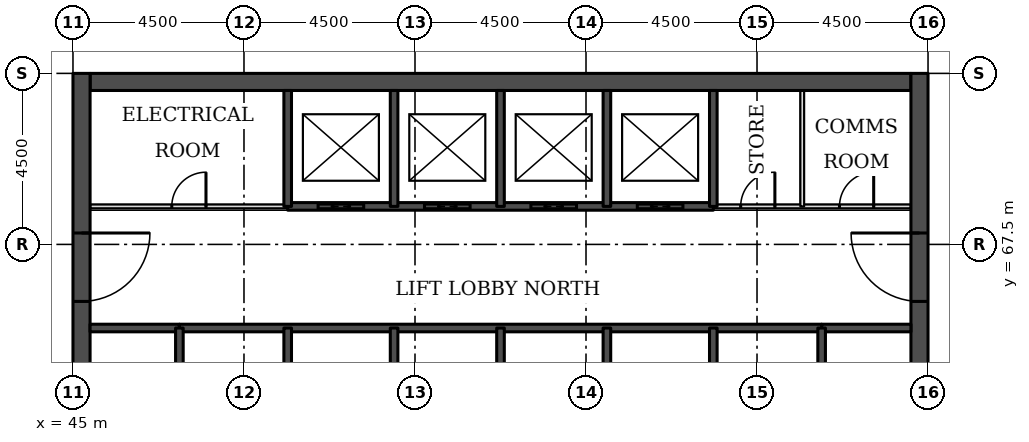
"""IFC4 building model, lengths in metres.
Left out: names, types, materials, properties, quantities, classifications, styles, units other than length and angle.
Written with IfcOpenShell. Run it as: python <this file> out.ifc"""

import sys

from ifc_helpers import new_model, si_unit, direction, frame, frame_2d, origin, place, context, subcontext, project, spatial, rectangle, extrude, element, fill, save


model = new_model("IFC4")
c1 = context("Model", 3, precision=1e-05, world=origin(), true_north=direction((0.0, 1.0)))
c2 = subcontext(c1, "Body", "Model", "MODEL_VIEW")
j1 = project(units=[si_unit("LENGTHUNIT", "METRE"), si_unit("PLANEANGLEUNIT", "RADIAN")], contexts=[c1])
p1 = place(None, origin())
s1 = spatial("IfcSite", under=j1, at=p1, CompositionType="ELEMENT")
p2 = place(p1, origin())
s2 = spatial("IfcBuilding", under=s1, at=p2, CompositionType="ELEMENT")
p3 = place(p2, frame((0.0, 0.0, 130.7)))
s3 = spatial("IfcBuildingStorey", under=s2, at=p3, CompositionType="ELEMENT", Elevation=130.7)
p4 = place(p3, frame((45.45, 71.775, 0.0), z_axis=(0.0, 0.0, 1.0), x_axis=(1.0, 0.0, 0.0)))
e1 = element("IfcWall", 1, at=p4, inside=s3, PredefinedType="SHEAR", context=c2, shape_type="SweptSolid", body=[
    extrude(rectangle(XDim=21.6, YDim=0.45, at=frame_2d((10.8, 0.0))), origin(), (0.0, 0.0, 1.0), 3.7),
])
p5 = place(p3, frame((45.225, 49.5, 0.0), z_axis=(0.0, 0.0, 1.0), x_axis=(0.0, 1.0, 0.0)))
e2 = element("IfcWall", 2, at=p5, inside=s3, PredefinedType="SHEAR", context=c2, shape_type="SweptSolid", body=[
    extrude(rectangle(XDim=22.5, YDim=0.45, at=frame_2d((11.25, 0.0))), origin(), (0.0, 0.0, 1.0), 3.7),
])
p6 = place(p5, frame((4.2, 0.0, 0.0)))
e3 = element("IfcOpeningElement", 3, at=p6, cuts=e2, PredefinedType="OPENING", context=c2, shape_type="SweptSolid", body=[
    extrude(rectangle(XDim=1.8, YDim=2.1, at=frame_2d((0.9, 1.05))), frame((0.0, 0.235, 0.0), z_axis=(0.0, -1.0, 0.0), x_axis=(1.0, 0.0, 0.0)), (0.0, 0.0, 1.0), 0.47),
])
p7 = place(p5, frame((6.9, 0.0, 0.0)))
e4 = element("IfcOpeningElement", 4, at=p7, cuts=e2, PredefinedType="OPENING", context=c2, shape_type="SweptSolid", body=[
    extrude(rectangle(XDim=1.1, YDim=2.1, at=frame_2d((0.55, 1.05))), frame((0.0, 0.235, 0.0), z_axis=(0.0, -1.0, 0.0), x_axis=(1.0, 0.0, 0.0)), (0.0, 0.0, 1.0), 0.47),
])
p8 = place(p5, frame((13.6, 0.0, 0.0)))
e5 = element("IfcOpeningElement", 5, at=p8, cuts=e2, PredefinedType="OPENING", context=c2, shape_type="SweptSolid", body=[
    extrude(rectangle(XDim=1.1, YDim=2.1, at=frame_2d((0.55, 1.05))), frame((0.0, 0.235, 0.0), z_axis=(0.0, -1.0, 0.0), x_axis=(1.0, 0.0, 0.0)), (0.0, 0.0, 1.0), 0.47),
])
p9 = place(p5, frame((16.5, 0.0, 0.0)))
e6 = element("IfcOpeningElement", 6, at=p9, cuts=e2, PredefinedType="OPENING", context=c2, shape_type="SweptSolid", body=[
    extrude(rectangle(XDim=1.8, YDim=2.1, at=frame_2d((0.9, 1.05))), frame((0.0, 0.235, 0.0), z_axis=(0.0, -1.0, 0.0), x_axis=(1.0, 0.0, 0.0)), (0.0, 0.0, 1.0), 0.47),
])
p10 = place(p3, frame((67.275, 49.5, 0.0), z_axis=(0.0, 0.0, 1.0), x_axis=(0.0, 1.0, 0.0)))
e7 = element("IfcWall", 7, at=p10, inside=s3, PredefinedType="SHEAR", context=c2, shape_type="SweptSolid", body=[
    extrude(rectangle(XDim=22.5, YDim=0.45, at=frame_2d((11.25, 0.0))), origin(), (0.0, 0.0, 1.0), 3.7),
])
p11 = place(p10, frame((4.2, 0.0, 0.0)))
e8 = element("IfcOpeningElement", 8, at=p11, cuts=e7, PredefinedType="OPENING", context=c2, shape_type="SweptSolid", body=[
    extrude(rectangle(XDim=1.8, YDim=2.1, at=frame_2d((0.9, 1.05))), frame((0.0, 0.235, 0.0), z_axis=(0.0, -1.0, 0.0), x_axis=(1.0, 0.0, 0.0)), (0.0, 0.0, 1.0), 0.47),
])
p12 = place(p10, frame((6.9, 0.0, 0.0)))
e9 = element("IfcOpeningElement", 9, at=p12, cuts=e7, PredefinedType="OPENING", context=c2, shape_type="SweptSolid", body=[
    extrude(rectangle(XDim=1.1, YDim=2.1, at=frame_2d((0.55, 1.05))), frame((0.0, 0.235, 0.0), z_axis=(0.0, -1.0, 0.0), x_axis=(1.0, 0.0, 0.0)), (0.0, 0.0, 1.0), 0.47),
])
p13 = place(p10, frame((13.6, 0.0, 0.0)))
e10 = element("IfcOpeningElement", 10, at=p13, cuts=e7, PredefinedType="OPENING", context=c2, shape_type="SweptSolid", body=[
    extrude(rectangle(XDim=1.1, YDim=2.1, at=frame_2d((0.55, 1.05))), frame((0.0, 0.235, 0.0), z_axis=(0.0, -1.0, 0.0), x_axis=(1.0, 0.0, 0.0)), (0.0, 0.0, 1.0), 0.47),
])
p14 = place(p10, frame((16.5, 0.0, 0.0)))
e11 = element("IfcOpeningElement", 11, at=p14, cuts=e7, PredefinedType="OPENING", context=c2, shape_type="SweptSolid", body=[
    extrude(rectangle(XDim=1.8, YDim=2.1, at=frame_2d((0.9, 1.05))), frame((0.0, 0.235, 0.0), z_axis=(0.0, -1.0, 0.0), x_axis=(1.0, 0.0, 0.0)), (0.0, 0.0, 1.0), 0.47),
])
for number, where, z_axis, x_axis in (
    (12, (45.45, 65.3, 0.0), (0.0, 0.0, 1.0), (1.0, 0.0, 0.0)),
    (13, (64.7, 65.3, 0.0), (0.0, 0.0, 1.0), (1.0, 0.0, 0.0)),
):
    element("IfcWall", number, at=place(p3, frame(where, z_axis=z_axis, x_axis=x_axis)), inside=s3, PredefinedType="SOLIDWALL", context=c2, shape_type="SweptSolid", body=[
        extrude(rectangle(XDim=2.35, YDim=0.2, at=frame_2d((1.175, 0.0))), origin(), (0.0, 0.0, 1.0), 3.55),
    ])
p15 = place(p3, frame((47.8, 65.3, 0.0), z_axis=(0.0, 0.0, 1.0), x_axis=(1.0, 0.0, 0.0)))
e14 = element("IfcWall", 14, at=p15, inside=s3, PredefinedType="SOLIDWALL", context=c2, shape_type="SweptSolid", body=[
    extrude(rectangle(XDim=16.9, YDim=0.2, at=frame_2d((8.45, 0.0))), origin(), (0.0, 0.0, 1.0), 3.55),
])
p16 = place(p3, frame((45.45, 68.5, 0.0), z_axis=(0.0, 0.0, 1.0), x_axis=(1.0, 0.0, 0.0)))
e15 = element("IfcWall", 15, at=p16, inside=s3, PredefinedType="PARTITIONING", context=c2, shape_type="SweptSolid", body=[
    extrude(rectangle(XDim=5.2, YDim=0.1, at=frame_2d((2.6, 0.0))), origin(), (0.0, 0.0, 1.0), 3.55),
])
p17 = place(p16, frame((2.15, 0.0, 0.0)))
e16 = element("IfcOpeningElement", 16, at=p17, cuts=e15, PredefinedType="OPENING", context=c2, shape_type="SweptSolid", body=[
    extrude(rectangle(XDim=0.9, YDim=2.1, at=frame_2d((0.45, 1.05))), frame((0.0, 0.06, 0.0), z_axis=(0.0, -1.0, 0.0), x_axis=(1.0, 0.0, 0.0)), (0.0, 0.0, 1.0), 0.12),
])
p18 = place(p3, frame((61.85, 68.5, 0.0), z_axis=(0.0, 0.0, 1.0), x_axis=(1.0, 0.0, 0.0)))
e17 = element("IfcWall", 17, at=p18, inside=s3, PredefinedType="PARTITIONING", context=c2, shape_type="SweptSolid", body=[
    extrude(rectangle(XDim=5.2, YDim=0.1, at=frame_2d((2.6, 0.0))), origin(), (0.0, 0.0, 1.0), 3.55),
])
p19 = place(p18, frame((3.32, 0.0, 0.0)))
e18 = element("IfcOpeningElement", 18, at=p19, cuts=e17, PredefinedType="OPENING", context=c2, shape_type="SweptSolid", body=[
    extrude(rectangle(XDim=0.9, YDim=2.1, at=frame_2d((0.45, 1.05))), frame((0.0, 0.06, 0.0), z_axis=(0.0, -1.0, 0.0), x_axis=(1.0, 0.0, 0.0)), (0.0, 0.0, 1.0), 0.12),
])
p20 = place(p18, frame((0.72, 0.0, 0.0)))
e19 = element("IfcOpeningElement", 19, at=p20, cuts=e17, PredefinedType="OPENING", context=c2, shape_type="SweptSolid", body=[
    extrude(rectangle(XDim=0.9, YDim=2.1, at=frame_2d((0.45, 1.05))), frame((0.0, 0.06, 0.0), z_axis=(0.0, -1.0, 0.0), x_axis=(1.0, 0.0, 0.0)), (0.0, 0.0, 1.0), 0.12),
])
p21 = place(p3, frame((50.65, 68.5, 0.0), z_axis=(0.0, 0.0, 1.0), x_axis=(1.0, 0.0, 0.0)))
e20 = element("IfcWall", 20, at=p21, inside=s3, PredefinedType="SOLIDWALL", context=c2, shape_type="SweptSolid", body=[
    extrude(rectangle(XDim=11.2, YDim=0.2, at=frame_2d((5.6, 0.0))), origin(), (0.0, 0.0, 1.0), 3.55),
])
p22 = place(p21, frame((0.8, 0.0, 0.0)))
e21 = element("IfcOpeningElement", 21, at=p22, cuts=e20, PredefinedType="OPENING", context=c2, shape_type="SweptSolid", body=[
    extrude(rectangle(XDim=1.2, YDim=2.1, at=frame_2d((0.6, 1.05))), frame((0.0, 0.11, 0.0), z_axis=(0.0, -1.0, 0.0), x_axis=(1.0, 0.0, 0.0)), (0.0, 0.0, 1.0), 0.22),
])
p23 = place(p21, frame((3.6, 0.0, 0.0)))
e22 = element("IfcOpeningElement", 22, at=p23, cuts=e20, PredefinedType="OPENING", context=c2, shape_type="SweptSolid", body=[
    extrude(rectangle(XDim=1.2, YDim=2.1, at=frame_2d((0.6, 1.05))), frame((0.0, 0.11, 0.0), z_axis=(0.0, -1.0, 0.0), x_axis=(1.0, 0.0, 0.0)), (0.0, 0.0, 1.0), 0.22),
])
p24 = place(p21, frame((6.4, 0.0, 0.0)))
e23 = element("IfcOpeningElement", 23, at=p24, cuts=e20, PredefinedType="OPENING", context=c2, shape_type="SweptSolid", body=[
    extrude(rectangle(XDim=1.2, YDim=2.1, at=frame_2d((0.6, 1.05))), frame((0.0, 0.11, 0.0), z_axis=(0.0, -1.0, 0.0), x_axis=(1.0, 0.0, 0.0)), (0.0, 0.0, 1.0), 0.22),
])
p25 = place(p21, frame((9.2, 0.0, 0.0)))
e24 = element("IfcOpeningElement", 24, at=p25, cuts=e20, PredefinedType="OPENING", context=c2, shape_type="SweptSolid", body=[
    extrude(rectangle(XDim=1.2, YDim=2.1, at=frame_2d((0.6, 1.05))), frame((0.0, 0.11, 0.0), z_axis=(0.0, -1.0, 0.0), x_axis=(1.0, 0.0, 0.0)), (0.0, 0.0, 1.0), 0.22),
])
p26 = place(p3, frame((47.8, 62.0, 0.0), z_axis=(0.0, 0.0, 1.0), x_axis=(0.0, 1.0, 0.0)))
e25 = element("IfcWall", 25, at=p26, inside=s3, PredefinedType="SOLIDWALL", context=c2, shape_type="SweptSolid", body=[
    extrude(rectangle(XDim=3.3, YDim=0.2, at=frame_2d((1.65, 0.0))), origin(), (0.0, 0.0, 1.0), 3.55),
])
p27 = place(p26, frame((1.1, 0.0, 0.0)))
e26 = element("IfcOpeningElement", 26, at=p27, cuts=e25, PredefinedType="OPENING", context=c2, shape_type="SweptSolid", body=[
    extrude(rectangle(XDim=1.1, YDim=2.1, at=frame_2d((0.55, 1.05))), frame((0.0, 0.11, 0.0), z_axis=(0.0, -1.0, 0.0), x_axis=(1.0, 0.0, 0.0)), (0.0, 0.0, 1.0), 0.22),
])
p28 = place(p3, frame((50.65, 62.0, 0.0), z_axis=(0.0, 0.0, 1.0), x_axis=(0.0, 1.0, 0.0)))
e27 = element("IfcWall", 27, at=p28, inside=s3, PredefinedType="SOLIDWALL", context=c2, shape_type="SweptSolid", body=[
    extrude(rectangle(XDim=3.3, YDim=0.2, at=frame_2d((1.65, 0.0))), origin(), (0.0, 0.0, 1.0), 3.55),
])
p29 = place(p3, frame((50.65, 68.5, 0.0), z_axis=(0.0, 0.0, 1.0), x_axis=(0.0, 1.0, 0.0)))
e28 = element("IfcWall", 28, at=p29, inside=s3, PredefinedType="SOLIDWALL", context=c2, shape_type="SweptSolid", body=[
    extrude(rectangle(XDim=3.05, YDim=0.2, at=frame_2d((1.525, 0.0))), origin(), (0.0, 0.0, 1.0), 3.55),
])
p30 = place(p3, frame((53.45, 62.5, 0.0), z_axis=(0.0, 0.0, 1.0), x_axis=(0.0, 1.0, 0.0)))
e29 = element("IfcWall", 29, at=p30, inside=s3, PredefinedType="SOLIDWALL", context=c2, shape_type="SweptSolid", body=[
    extrude(rectangle(XDim=2.8, YDim=0.2, at=frame_2d((1.4, 0.0))), origin(), (0.0, 0.0, 1.0), 3.55),
])
p31 = place(p3, frame((53.45, 68.5, 0.0), z_axis=(0.0, 0.0, 1.0), x_axis=(0.0, 1.0, 0.0)))
e30 = element("IfcWall", 30, at=p31, inside=s3, PredefinedType="SOLIDWALL", context=c2, shape_type="SweptSolid", body=[
    extrude(rectangle(XDim=3.05, YDim=0.2, at=frame_2d((1.525, 0.0))), origin(), (0.0, 0.0, 1.0), 3.55),
])
p32 = place(p3, frame((56.25, 62.5, 0.0), z_axis=(0.0, 0.0, 1.0), x_axis=(0.0, 1.0, 0.0)))
e31 = element("IfcWall", 31, at=p32, inside=s3, PredefinedType="SOLIDWALL", context=c2, shape_type="SweptSolid", body=[
    extrude(rectangle(XDim=2.8, YDim=0.2, at=frame_2d((1.4, 0.0))), origin(), (0.0, 0.0, 1.0), 3.55),
])
p33 = place(p3, frame((56.25, 68.5, 0.0), z_axis=(0.0, 0.0, 1.0), x_axis=(0.0, 1.0, 0.0)))
e32 = element("IfcWall", 32, at=p33, inside=s3, PredefinedType="SOLIDWALL", context=c2, shape_type="SweptSolid", body=[
    extrude(rectangle(XDim=3.05, YDim=0.2, at=frame_2d((1.525, 0.0))), origin(), (0.0, 0.0, 1.0), 3.55),
])
p34 = place(p3, frame((59.05, 62.5, 0.0), z_axis=(0.0, 0.0, 1.0), x_axis=(0.0, 1.0, 0.0)))
e33 = element("IfcWall", 33, at=p34, inside=s3, PredefinedType="SOLIDWALL", context=c2, shape_type="SweptSolid", body=[
    extrude(rectangle(XDim=2.8, YDim=0.2, at=frame_2d((1.4, 0.0))), origin(), (0.0, 0.0, 1.0), 3.55),
])
p35 = place(p3, frame((59.05, 68.5, 0.0), z_axis=(0.0, 0.0, 1.0), x_axis=(0.0, 1.0, 0.0)))
e34 = element("IfcWall", 34, at=p35, inside=s3, PredefinedType="SOLIDWALL", context=c2, shape_type="SweptSolid", body=[
    extrude(rectangle(XDim=3.05, YDim=0.2, at=frame_2d((1.525, 0.0))), origin(), (0.0, 0.0, 1.0), 3.55),
])
p36 = place(p3, frame((61.85, 62.0, 0.0), z_axis=(0.0, 0.0, 1.0), x_axis=(0.0, 1.0, 0.0)))
e35 = element("IfcWall", 35, at=p36, inside=s3, PredefinedType="SOLIDWALL", context=c2, shape_type="SweptSolid", body=[
    extrude(rectangle(XDim=3.3, YDim=0.2, at=frame_2d((1.65, 0.0))), origin(), (0.0, 0.0, 1.0), 3.55),
])
p37 = place(p3, frame((61.85, 68.5, 0.0), z_axis=(0.0, 0.0, 1.0), x_axis=(0.0, 1.0, 0.0)))
e36 = element("IfcWall", 36, at=p37, inside=s3, PredefinedType="SOLIDWALL", context=c2, shape_type="SweptSolid", body=[
    extrude(rectangle(XDim=3.05, YDim=0.2, at=frame_2d((1.525, 0.0))), origin(), (0.0, 0.0, 1.0), 3.55),
])
p38 = place(p3, frame((64.19, 68.5, 0.0), z_axis=(0.0, 0.0, 1.0), x_axis=(0.0, 1.0, 0.0)))
e37 = element("IfcWall", 37, at=p38, inside=s3, PredefinedType="PARTITIONING", context=c2, shape_type="SweptSolid", body=[
    extrude(rectangle(XDim=3.05, YDim=0.1, at=frame_2d((1.525, 0.0))), origin(), (0.0, 0.0, 1.0), 3.55),
])
p39 = place(p3, frame((64.7, 62.0, 0.0), z_axis=(0.0, 0.0, 1.0), x_axis=(0.0, 1.0, 0.0)))
e38 = element("IfcWall", 38, at=p39, inside=s3, PredefinedType="SOLIDWALL", context=c2, shape_type="SweptSolid", body=[
    extrude(rectangle(XDim=3.3, YDim=0.2, at=frame_2d((1.65, 0.0))), origin(), (0.0, 0.0, 1.0), 3.55),
])
p40 = place(p39, frame((1.1, 0.0, 0.0)))
e39 = element("IfcOpeningElement", 39, at=p40, cuts=e38, PredefinedType="OPENING", context=c2, shape_type="SweptSolid", body=[
    extrude(rectangle(XDim=1.1, YDim=2.1, at=frame_2d((0.55, 1.05))), frame((0.0, 0.11, 0.0), z_axis=(0.0, -1.0, 0.0), x_axis=(1.0, 0.0, 0.0)), (0.0, 0.0, 1.0), 0.22),
])
p41 = place(p22, origin())
e40 = element("IfcDoor", 40, at=p41, inside=s3, OperationType="DOUBLE_DOOR_SLIDING", PredefinedType="DOOR", context=c2, shape_type="SweptSolid", body=[
    extrude(rectangle(XDim=1.2, YDim=2.1, at=frame_2d((0.6, 1.05))), frame((0.0, 0.025, 0.0), z_axis=(0.0, -1.0, 0.0), x_axis=(1.0, 0.0, 0.0)), (0.0, 0.0, 1.0), 0.05),
])
fill(e21, e40)
p42 = place(p23, origin())
e41 = element("IfcDoor", 41, at=p42, inside=s3, OperationType="DOUBLE_DOOR_SLIDING", PredefinedType="DOOR", context=c2, shape_type="SweptSolid", body=[
    extrude(rectangle(XDim=1.2, YDim=2.1, at=frame_2d((0.6, 1.05))), frame((0.0, 0.025, 0.0), z_axis=(0.0, -1.0, 0.0), x_axis=(1.0, 0.0, 0.0)), (0.0, 0.0, 1.0), 0.05),
])
fill(e22, e41)
p43 = place(p24, origin())
e42 = element("IfcDoor", 42, at=p43, inside=s3, OperationType="DOUBLE_DOOR_SLIDING", PredefinedType="DOOR", context=c2, shape_type="SweptSolid", body=[
    extrude(rectangle(XDim=1.2, YDim=2.1, at=frame_2d((0.6, 1.05))), frame((0.0, 0.025, 0.0), z_axis=(0.0, -1.0, 0.0), x_axis=(1.0, 0.0, 0.0)), (0.0, 0.0, 1.0), 0.05),
])
fill(e23, e42)
p44 = place(p25, origin())
e43 = element("IfcDoor", 43, at=p44, inside=s3, OperationType="DOUBLE_DOOR_SLIDING", PredefinedType="DOOR", context=c2, shape_type="SweptSolid", body=[
    extrude(rectangle(XDim=1.2, YDim=2.1, at=frame_2d((0.6, 1.05))), frame((0.0, 0.025, 0.0), z_axis=(0.0, -1.0, 0.0), x_axis=(1.0, 0.0, 0.0)), (0.0, 0.0, 1.0), 0.05),
])
fill(e24, e43)
p45 = place(p9, frame((1.8, 0.0, 0.0), z_axis=(0.0, 0.0, 1.0), x_axis=(-1.0, 0.0, 0.0)))
e44 = element("IfcDoor", 44, at=p45, inside=s3, OperationType="SINGLE_SWING_LEFT", PredefinedType="DOOR", context=c2, shape_type="SweptSolid", body=[
    extrude(rectangle(XDim=1.8, YDim=2.1, at=frame_2d((0.9, 1.05))), frame((0.0, 0.025, 0.0), z_axis=(0.0, -1.0, 0.0), x_axis=(1.0, 0.0, 0.0)), (0.0, 0.0, 1.0), 0.05),
])
fill(e6, e44)
p46 = place(p14, origin())
e45 = element("IfcDoor", 45, at=p46, inside=s3, OperationType="SINGLE_SWING_RIGHT", PredefinedType="DOOR", context=c2, shape_type="SweptSolid", body=[
    extrude(rectangle(XDim=1.8, YDim=2.1, at=frame_2d((0.9, 1.05))), frame((0.0, 0.025, 0.0), z_axis=(0.0, -1.0, 0.0), x_axis=(1.0, 0.0, 0.0)), (0.0, 0.0, 1.0), 0.05),
])
fill(e11, e45)
p47 = place(p19, origin())
e46 = element("IfcDoor", 46, at=p47, inside=s3, OperationType="SINGLE_SWING_RIGHT", PredefinedType="DOOR", context=c2, shape_type="SweptSolid", body=[
    extrude(rectangle(XDim=0.9, YDim=2.1, at=frame_2d((0.45, 1.05))), frame((0.0, 0.025, 0.0), z_axis=(0.0, -1.0, 0.0), x_axis=(1.0, 0.0, 0.0)), (0.0, 0.0, 1.0), 0.05),
])
fill(e18, e46)
p48 = place(p20, origin())
e47 = element("IfcDoor", 47, at=p48, inside=s3, OperationType="SINGLE_SWING_RIGHT", PredefinedType="DOOR", context=c2, shape_type="SweptSolid", body=[
    extrude(rectangle(XDim=0.9, YDim=2.1, at=frame_2d((0.45, 1.05))), frame((0.0, 0.025, 0.0), z_axis=(0.0, -1.0, 0.0), x_axis=(1.0, 0.0, 0.0)), (0.0, 0.0, 1.0), 0.05),
])
fill(e19, e47)
p49 = place(p17, origin())
e48 = element("IfcDoor", 48, at=p49, inside=s3, OperationType="SINGLE_SWING_RIGHT", PredefinedType="DOOR", context=c2, shape_type="SweptSolid", body=[
    extrude(rectangle(XDim=0.9, YDim=2.1, at=frame_2d((0.45, 1.05))), frame((0.0, 0.025, 0.0), z_axis=(0.0, -1.0, 0.0), x_axis=(1.0, 0.0, 0.0)), (0.0, 0.0, 1.0), 0.05),
])
fill(e16, e48)
save(model, sys.argv[1])
